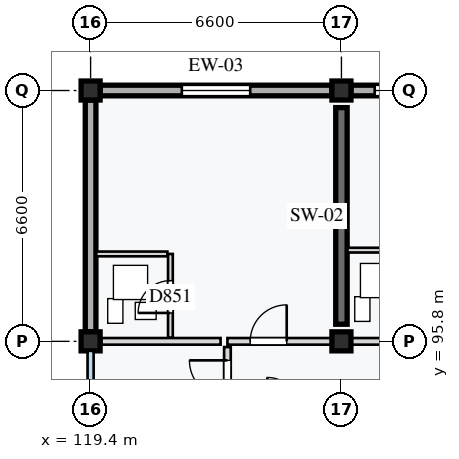
"""IFC4 building model, lengths in metres.
Left out: names, types, materials, properties, quantities, classifications, styles, units other than length and angle.
Written with IfcOpenShell. Run it as: python <this file> out.ifc"""

import sys

from ifc_helpers import new_model, si_unit, direction, frame, frame_2d, origin, origin_2d, place, context, subcontext, project, spatial, rectangle, extrude, element, fill, save


model = new_model("IFC4")
c1 = context("Model", 3, precision=1e-05, world=origin(), true_north=direction((0.0, 1.0)))
c2 = subcontext(c1, "Body", "Model", "MODEL_VIEW")
j1 = project(units=[si_unit("LENGTHUNIT", "METRE"), si_unit("PLANEANGLEUNIT", "RADIAN")], contexts=[c1])
p1 = place(None, origin())
s1 = spatial("IfcSite", under=j1, at=p1, CompositionType="ELEMENT")
p2 = place(p1, origin())
s2 = spatial("IfcBuilding", under=s1, at=p2, CompositionType="ELEMENT")
p3 = place(p2, frame((0.0, 0.0, 27.6)))
s3 = spatial("IfcBuildingStorey", under=s2, at=p3, CompositionType="ELEMENT", Elevation=27.6)
for number, where, z_axis, x_axis in (
    (1, (119.4, 95.8, 0.0), (0.0, 0.0, 1.0), (1.0, 0.0, 0.0)),
    (2, (119.4, 102.4, 0.0), (0.0, 0.0, 1.0), (1.0, 0.0, 0.0)),
    (3, (126.0, 95.8, 0.0), (0.0, 0.0, 1.0), (1.0, 0.0, 0.0)),
    (4, (126.0, 102.4, 0.0), (0.0, 0.0, 1.0), (1.0, 0.0, 0.0)),
):
    element("IfcColumn", number, at=place(p3, frame(where, z_axis=z_axis, x_axis=x_axis)), inside=s3, PredefinedType="COLUMN", context=c2, shape_type="SweptSolid", body=[
        extrude(rectangle(XDim=0.5, YDim=0.5, at=origin_2d()), origin(), (0.0, 0.0, 1.0), 3.2),
    ])
p4 = place(p3, frame((126.0, 96.25, 0.0), z_axis=(0.0, 0.0, 1.0), x_axis=(0.0, 1.0, 0.0)))
e5 = element("IfcWall", 5, at=p4, inside=s3, PredefinedType="SHEAR", context=c2, shape_type="SweptSolid", body=[
    extrude(rectangle(XDim=5.7, YDim=0.3, at=frame_2d((2.85, 0.0))), origin(), (0.0, 0.0, 1.0), 2.97),
])
p5 = place(p3, frame((119.65, 102.4, 0.0), z_axis=(0.0, 0.0, 1.0), x_axis=(1.0, 0.0, 0.0)))
e6 = element("IfcWall", 6, at=p5, inside=s3, PredefinedType="STANDARD", context=c2, shape_type="SweptSolid", body=[
    extrude(rectangle(XDim=6.1, YDim=0.28, at=frame_2d((3.05, 0.0))), origin(), (0.0, 0.0, 1.0), 2.65),
])
p6 = place(p5, frame((2.15, 0.0, 0.85)))
e7 = element("IfcOpeningElement", 7, at=p6, cuts=e6, PredefinedType="OPENING", context=c2, shape_type="SweptSolid", body=[
    extrude(rectangle(XDim=1.8, YDim=1.35, at=frame_2d((0.9, 0.675))), frame((0.0, 0.15, 0.0), z_axis=(0.0, -1.0, 0.0), x_axis=(1.0, 0.0, 0.0)), (0.0, 0.0, 1.0), 0.3),
])
p7 = place(p3, frame((126.25, 102.4, 0.0), z_axis=(0.0, 0.0, 1.0), x_axis=(1.0, 0.0, 0.0)))
e8 = element("IfcWall", 8, at=p7, inside=s3, PredefinedType="STANDARD", context=c2, shape_type="SweptSolid", body=[
    extrude(rectangle(XDim=6.1, YDim=0.28, at=frame_2d((3.05, 0.0))), origin(), (0.0, 0.0, 1.0), 2.65),
])
p8 = place(p7, frame((0.625, 0.0, 0.85)))
e9 = element("IfcOpeningElement", 9, at=p8, cuts=e8, PredefinedType="OPENING", context=c2, shape_type="SweptSolid", body=[
    extrude(rectangle(XDim=1.8, YDim=1.35, at=frame_2d((0.9, 0.675))), frame((0.0, 0.15, 0.0), z_axis=(0.0, -1.0, 0.0), x_axis=(1.0, 0.0, 0.0)), (0.0, 0.0, 1.0), 0.3),
])
p9 = place(p7, frame((4.05, 0.0, 0.85)))
e10 = element("IfcOpeningElement", 10, at=p9, cuts=e8, PredefinedType="OPENING", context=c2, shape_type="SweptSolid", body=[
    extrude(rectangle(XDim=1.5, YDim=1.35, at=frame_2d((0.75, 0.675))), frame((0.0, 0.15, 0.0), z_axis=(0.0, -1.0, 0.0), x_axis=(1.0, 0.0, 0.0)), (0.0, 0.0, 1.0), 0.3),
])
p10 = place(p3, frame((119.4, 96.05, 0.0), z_axis=(0.0, 0.0, 1.0), x_axis=(0.0, 1.0, 0.0)))
e11 = element("IfcWall", 11, at=p10, inside=s3, PredefinedType="STANDARD", context=c2, shape_type="SweptSolid", body=[
    extrude(rectangle(XDim=6.1, YDim=0.28, at=frame_2d((3.05, 0.0))), origin(), (0.0, 0.0, 1.0), 2.65),
])
p11 = place(p3, frame((123.0, 92.65, 0.0), z_axis=(0.0, 0.0, 1.0), x_axis=(0.0, 1.0, 0.0)))
e12 = element("IfcWall", 12, at=p11, inside=s3, PredefinedType="PARTITIONING", context=c2, shape_type="SweptSolid", body=[
    extrude(rectangle(XDim=3.0, YDim=0.175, at=frame_2d((1.5, 0.0))), origin(), (0.0, 0.0, 1.0), 2.97),
])
p12 = place(p11, frame((1.65, 0.0, 0.0)))
e13 = element("IfcOpeningElement", 13, at=p12, cuts=e12, PredefinedType="OPENING", context=c2, shape_type="SweptSolid", body=[
    extrude(rectangle(XDim=1.0, YDim=2.16, at=frame_2d((0.5, 1.08))), frame((0.0, 0.097, 0.0), z_axis=(0.0, -1.0, 0.0), x_axis=(1.0, 0.0, 0.0)), (0.0, 0.0, 1.0), 0.195),
])
p13 = place(p3, frame((119.68, 95.8, 0.0), z_axis=(0.0, 0.0, 1.0), x_axis=(1.0, 0.0, 0.0)))
e14 = element("IfcWall", 14, at=p13, inside=s3, PredefinedType="PARTITIONING", context=c2, shape_type="SweptSolid", body=[
    extrude(rectangle(XDim=3.14, YDim=0.175, at=frame_2d((1.57, 0.0))), origin(), (0.0, 0.0, 1.0), 2.55),
])
p14 = place(p3, frame((123.0, 95.8, 0.0), z_axis=(0.0, 0.0, 1.0), x_axis=(1.0, 0.0, 0.0)))
e15 = element("IfcWall", 15, at=p14, inside=s3, PredefinedType="PARTITIONING", context=c2, shape_type="SweptSolid", body=[
    extrude(rectangle(XDim=3.0, YDim=0.175, at=frame_2d((1.5, 0.0))), origin(), (0.0, 0.0, 1.0), 2.55),
])
p15 = place(p14, frame((0.6, 0.0, 0.0)))
e16 = element("IfcOpeningElement", 16, at=p15, cuts=e15, PredefinedType="OPENING", context=c2, shape_type="SweptSolid", body=[
    extrude(rectangle(XDim=0.96, YDim=2.18, at=frame_2d((0.48, 1.09))), frame((0.0, 0.097, 0.0), z_axis=(0.0, -1.0, 0.0), x_axis=(1.0, 0.0, 0.0)), (0.0, 0.0, 1.0), 0.195),
])
p16 = place(p3, frame((121.5, 95.897, 0.0), z_axis=(0.0, 0.0, 1.0), x_axis=(0.0, 1.0, 0.0)))
e17 = element("IfcWall", 17, at=p16, inside=s3, PredefinedType="PARTITIONING", context=c2, shape_type="SweptSolid", body=[
    extrude(rectangle(XDim=2.203, YDim=0.125, at=frame_2d((1.101, 0.0))), origin(), (0.0, 0.0, 1.0), 2.97),
])
p17 = place(p16, frame((0.65, 0.0, 0.0)))
e18 = element("IfcOpeningElement", 18, at=p17, cuts=e17, PredefinedType="OPENING", context=c2, shape_type="SweptSolid", body=[
    extrude(rectangle(XDim=0.85, YDim=2.04, at=frame_2d((0.425, 1.02))), frame((0.0, 0.073, 0.0), z_axis=(0.0, -1.0, 0.0), x_axis=(1.0, 0.0, 0.0)), (0.0, 0.0, 1.0), 0.145),
])
p18 = place(p3, frame((119.55, 98.1, 0.0), z_axis=(0.0, 0.0, 1.0), x_axis=(1.0, 0.0, 0.0)))
e19 = element("IfcWall", 19, at=p18, inside=s3, PredefinedType="PARTITIONING", context=c2, shape_type="SweptSolid", body=[
    extrude(rectangle(XDim=1.87, YDim=0.125, at=frame_2d((0.935, 0.0))), origin(), (0.0, 0.0, 1.0), 2.97),
])
p19 = place(p3, frame((126.0, 95.8, 0.0), z_axis=(0.0, 0.0, 1.0), x_axis=(1.0, 0.0, 0.0)))
e20 = element("IfcWall", 20, at=p19, inside=s3, PredefinedType="PARTITIONING", context=c2, shape_type="SweptSolid", body=[
    extrude(rectangle(XDim=6.6, YDim=0.175, at=frame_2d((3.3, 0.0))), origin(), (0.0, 0.0, 1.0), 2.55),
])
p20 = place(p19, frame((3.85, 0.0, 0.0)))
e21 = element("IfcOpeningElement", 21, at=p20, cuts=e20, PredefinedType="OPENING", context=c2, shape_type="SweptSolid", body=[
    extrude(rectangle(XDim=0.95, YDim=2.16, at=frame_2d((0.475, 1.08))), frame((0.0, 0.097, 0.0), z_axis=(0.0, -1.0, 0.0), x_axis=(1.0, 0.0, 0.0)), (0.0, 0.0, 1.0), 0.195),
])
p21 = place(p3, frame((126.16, 98.2, 0.0), z_axis=(0.0, 0.0, 1.0), x_axis=(1.0, 0.0, 0.0)))
e22 = element("IfcWall", 22, at=p21, inside=s3, PredefinedType="PARTITIONING", context=c2, shape_type="SweptSolid", body=[
    extrude(rectangle(XDim=1.66, YDim=0.125, at=frame_2d((0.83, 0.0))), origin(), (0.0, 0.0, 1.0), 2.97),
])
p22 = place(p6, origin())
e23 = element("IfcWindow", 23, at=p22, inside=s3, PartitioningType="SINGLE_PANEL", PredefinedType="WINDOW", context=c2, shape_type="SweptSolid", body=[
    extrude(rectangle(XDim=1.8, YDim=1.35, at=frame_2d((0.9, 0.675))), frame((0.0, 0.03, 0.0), z_axis=(0.0, -1.0, 0.0), x_axis=(1.0, 0.0, 0.0)), (0.0, 0.0, 1.0), 0.06),
])
fill(e7, e23)
p23 = place(p8, origin())
e24 = element("IfcWindow", 24, at=p23, inside=s3, PartitioningType="SINGLE_PANEL", PredefinedType="WINDOW", context=c2, shape_type="SweptSolid", body=[
    extrude(rectangle(XDim=1.8, YDim=1.35, at=frame_2d((0.9, 0.675))), frame((0.0, 0.03, 0.0), z_axis=(0.0, -1.0, 0.0), x_axis=(1.0, 0.0, 0.0)), (0.0, 0.0, 1.0), 0.06),
])
fill(e9, e24)
p24 = place(p12, origin())
e25 = element("IfcDoor", 25, at=p24, inside=s3, OperationType="SINGLE_SWING_RIGHT", PredefinedType="DOOR", context=c2, shape_type="SweptSolid", body=[
    extrude(rectangle(XDim=1.0, YDim=2.16, at=frame_2d((0.5, 1.08))), frame((0.0, 0.025, 0.0), z_axis=(0.0, -1.0, 0.0), x_axis=(1.0, 0.0, 0.0)), (0.0, 0.0, 1.0), 0.05),
])
fill(e13, e25)
p25 = place(p15, origin())
e26 = element("IfcDoor", 26, at=p25, inside=s3, OperationType="SINGLE_SWING_RIGHT", PredefinedType="DOOR", context=c2, shape_type="SweptSolid", body=[
    extrude(rectangle(XDim=0.96, YDim=2.18, at=frame_2d((0.48, 1.09))), frame((0.0, 0.025, 0.0), z_axis=(0.0, -1.0, 0.0), x_axis=(1.0, 0.0, 0.0)), (0.0, 0.0, 1.0), 0.05),
])
fill(e16, e26)
p26 = place(p17, origin())
e27 = element("IfcDoor", 27, at=p26, inside=s3, OperationType="SINGLE_SWING_LEFT", PredefinedType="DOOR", context=c2, shape_type="SweptSolid", body=[
    extrude(rectangle(XDim=0.85, YDim=2.04, at=frame_2d((0.425, 1.02))), frame((0.0, 0.025, 0.0), z_axis=(0.0, -1.0, 0.0), x_axis=(1.0, 0.0, 0.0)), (0.0, 0.0, 1.0), 0.05),
])
fill(e18, e27)
save(model, sys.argv[1])
